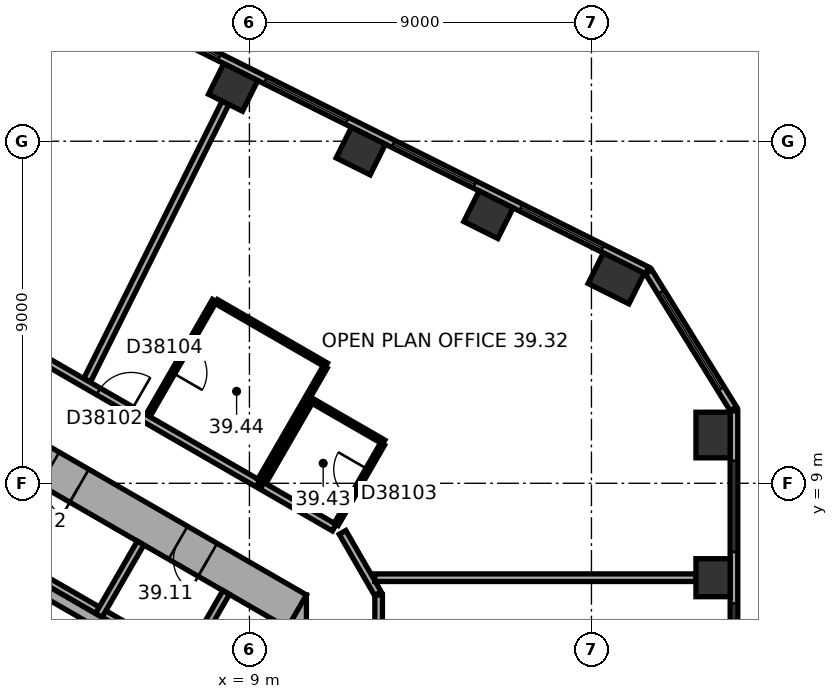
"""IFC4 building model, lengths in metres.
Left out: names, types, materials, properties, quantities, classifications, styles, units other than length and angle.
Written with IfcOpenShell. Run it as: python <this file> out.ifc"""

import sys

from ifc_helpers import new_model, si_unit, direction, frame, frame_2d, origin, origin_2d, place, context, subcontext, project, spatial, rectangle, extrude, element, fill, save


model = new_model("IFC4")
c1 = context("Model", 3, precision=1e-05, world=origin(), true_north=direction((0.0, 1.0)))
c2 = subcontext(c1, "Body", "Model", "MODEL_VIEW")
j1 = project(units=[si_unit("LENGTHUNIT", "METRE"), si_unit("PLANEANGLEUNIT", "RADIAN")], contexts=[c1])
p1 = place(None, origin())
s1 = spatial("IfcSite", under=j1, at=p1, CompositionType="ELEMENT")
p2 = place(p1, origin())
s2 = spatial("IfcBuilding", under=s1, at=p2, CompositionType="ELEMENT")
p3 = place(p2, frame((0.0, 0.0, 161.4)))
s3 = spatial("IfcBuildingStorey", under=s2, at=p3, CompositionType="ELEMENT", Elevation=161.4)
p4 = place(p3, frame((21.2, 6.515, 0.0), z_axis=(0.0, 0.0, 1.0), x_axis=(0.0, 1.0, 0.0)))
e1 = element("IfcColumn", 1, at=p4, inside=s3, PredefinedType="COLUMN", context=c2, shape_type="SweptSolid", body=[
    extrude(rectangle(XDim=1.0, YDim=0.9, at=origin_2d()), origin(), (0.0, 0.0, 1.0), 3.7),
])
for number, where, z_axis, x_axis in (
    (2, (21.2, 10.27, 0.0), (0.0, 0.0, 1.0), (0.0, 1.0, 0.0)),
    (3, (18.65, 14.39, 0.0), (0.0, 0.0, 1.0), (-0.895, 0.446, 0.0)),
):
    element("IfcColumn", number, at=place(p3, frame(where, z_axis=z_axis, x_axis=x_axis)), inside=s3, PredefinedType="COLUMN", context=c2, shape_type="SweptSolid", body=[
        extrude(rectangle(XDim=1.2, YDim=0.9, at=origin_2d()), origin(), (0.0, 0.0, 1.0), 3.7),
    ])
for number, where, z_axis, x_axis in (
    (4, (15.29, 16.065, 0.0), (0.0, 0.0, 1.0), (-0.895, 0.446, 0.0)),
    (5, (11.931, 17.74, 0.0), (0.0, 0.0, 1.0), (-0.895, 0.446, 0.0)),
    (6, (8.571, 19.416, 0.0), (0.0, 0.0, 1.0), (-0.895, 0.446, 0.0)),
):
    element("IfcColumn", number, at=place(p3, frame(where, z_axis=z_axis, x_axis=x_axis)), inside=s3, PredefinedType="COLUMN", context=c2, shape_type="SweptSolid", body=[
        extrude(rectangle(XDim=1.0, YDim=0.9, at=origin_2d()), origin(), (0.0, 0.0, 1.0), 3.7),
    ])
p5 = place(p3, frame((10.0, -6.062, 0.0), z_axis=(0.0, 0.0, 1.0), x_axis=(0.0, 1.0, 0.0)))
e7 = element("IfcWall", 7, at=p5, inside=s3, PredefinedType="SHEAR", context=c2, shape_type="SweptSolid", body=[
    extrude(rectangle(XDim=12.125, YDim=1.0, at=frame_2d((6.062, 0.0))), origin(), (0.0, 0.0, 1.0), 3.7),
])
p6 = place(p5, frame((6.262, 0.0, 0.0)))
e8 = element("IfcOpeningElement", 8, at=p6, cuts=e7, PredefinedType="OPENING", context=c2, shape_type="SweptSolid", body=[
    extrude(rectangle(XDim=1.5, YDim=2.1, at=frame_2d((0.75, 1.05))), frame((0.0, 0.51, 0.0), z_axis=(0.0, -1.0, 0.0), x_axis=(1.0, 0.0, 0.0)), (0.0, 0.0, 1.0), 1.02),
])
p7 = place(p5, frame((1.812, 0.0, 0.0)))
e9 = element("IfcOpeningElement", 9, at=p7, cuts=e7, PredefinedType="OPENING", context=c2, shape_type="SweptSolid", body=[
    extrude(rectangle(XDim=0.9, YDim=2.1, at=frame_2d((0.45, 1.05))), frame((0.0, 0.51, 0.0), z_axis=(0.0, -1.0, 0.0), x_axis=(1.0, 0.0, 0.0)), (0.0, 0.0, 1.0), 1.02),
])
p8 = place(p5, frame((4.412, 0.0, 0.0)))
e10 = element("IfcOpeningElement", 10, at=p8, cuts=e7, PredefinedType="OPENING", context=c2, shape_type="SweptSolid", body=[
    extrude(rectangle(XDim=0.9, YDim=2.1, at=frame_2d((0.45, 1.05))), frame((0.0, 0.51, 0.0), z_axis=(0.0, -1.0, 0.0), x_axis=(1.0, 0.0, 0.0)), (0.0, 0.0, 1.0), 1.02),
])
p9 = place(p3, frame((10.25, 5.629, 0.0), z_axis=(0.0, 0.0, 1.0), x_axis=(-0.866022616891, 0.50000482701, 0.0)))
e11 = element("IfcWall", 11, at=p9, inside=s3, PredefinedType="SHEAR", context=c2, shape_type="SweptSolid", body=[
    extrude(rectangle(XDim=12.125, YDim=1.0, at=frame_2d((6.062, 0.0))), origin(), (0.0, 0.0, 1.0), 3.7),
])
p10 = place(p9, frame((2.712, 0.0, 0.0)))
e12 = element("IfcOpeningElement", 12, at=p10, cuts=e11, PredefinedType="OPENING", context=c2, shape_type="SweptSolid", body=[
    extrude(rectangle(XDim=0.9, YDim=2.1, at=frame_2d((0.45, 1.05))), frame((0.0, 0.51, 0.0), z_axis=(0.0, -1.0, 0.0), x_axis=(1.0, 0.0, 0.0)), (0.0, 0.0, 1.0), 1.02),
])
p11 = place(p9, frame((6.612, 0.0, 0.0)))
e13 = element("IfcOpeningElement", 13, at=p11, cuts=e11, PredefinedType="OPENING", context=c2, shape_type="SweptSolid", body=[
    extrude(rectangle(XDim=0.9, YDim=2.1, at=frame_2d((0.45, 1.05))), frame((0.0, 0.51, 0.0), z_axis=(0.0, -1.0, 0.0), x_axis=(1.0, 0.0, 0.0)), (0.0, 0.0, 1.0), 1.02),
])
p12 = place(p3, frame((21.75, -9.138, 0.0), z_axis=(0.0, 0.0, 1.0), x_axis=(0.0, 1.0, 0.0)))
e14 = element("IfcWall", 14, at=p12, inside=s3, PredefinedType="STANDARD", context=c2, shape_type="SweptSolid", body=[
    extrude(rectangle(XDim=20.044, YDim=0.2, at=frame_2d((10.022, 0.0))), origin(), (0.0, 0.0, 1.0), 3.7),
])
p13 = place(p12, frame((1.314, 0.0, 0.9)))
e15 = element("IfcOpeningElement", 15, at=p13, cuts=e14, PredefinedType="OPENING", context=c2, shape_type="SweptSolid", body=[
    extrude(rectangle(XDim=2.4, YDim=2.0, at=frame_2d((1.2, 1.0))), frame((0.0, 0.11, 0.0), z_axis=(0.0, -1.0, 0.0), x_axis=(1.0, 0.0, 0.0)), (0.0, 0.0, 1.0), 0.22),
])
p14 = place(p12, frame((5.069, 0.0, 0.9)))
e16 = element("IfcOpeningElement", 16, at=p14, cuts=e14, PredefinedType="OPENING", context=c2, shape_type="SweptSolid", body=[
    extrude(rectangle(XDim=2.4, YDim=2.0, at=frame_2d((1.2, 1.0))), frame((0.0, 0.11, 0.0), z_axis=(0.0, -1.0, 0.0), x_axis=(1.0, 0.0, 0.0)), (0.0, 0.0, 1.0), 0.22),
])
p15 = place(p12, frame((8.823, 0.0, 0.9)))
e17 = element("IfcOpeningElement", 17, at=p15, cuts=e14, PredefinedType="OPENING", context=c2, shape_type="SweptSolid", body=[
    extrude(rectangle(XDim=2.4, YDim=2.0, at=frame_2d((1.2, 1.0))), frame((0.0, 0.11, 0.0), z_axis=(0.0, -1.0, 0.0), x_axis=(1.0, 0.0, 0.0)), (0.0, 0.0, 1.0), 0.22),
])
p16 = place(p12, frame((12.577, 0.0, 0.9)))
e18 = element("IfcOpeningElement", 18, at=p16, cuts=e14, PredefinedType="OPENING", context=c2, shape_type="SweptSolid", body=[
    extrude(rectangle(XDim=2.4, YDim=2.0, at=frame_2d((1.2, 1.0))), frame((0.0, 0.11, 0.0), z_axis=(0.0, -1.0, 0.0), x_axis=(1.0, 0.0, 0.0)), (0.0, 0.0, 1.0), 0.22),
])
p17 = place(p12, frame((16.331, 0.0, 0.9)))
e19 = element("IfcOpeningElement", 19, at=p17, cuts=e14, PredefinedType="OPENING", context=c2, shape_type="SweptSolid", body=[
    extrude(rectangle(XDim=2.4, YDim=2.0, at=frame_2d((1.2, 1.0))), frame((0.0, 0.11, 0.0), z_axis=(0.0, -1.0, 0.0), x_axis=(1.0, 0.0, 0.0)), (0.0, 0.0, 1.0), 0.22),
])
p18 = place(p3, frame((21.735, 10.958, 0.0), z_axis=(0.0, 0.0, 1.0), x_axis=(-0.526213807775, 0.850352296702, 0.0)))
e20 = element("IfcWall", 20, at=p18, inside=s3, PredefinedType="STANDARD", context=c2, shape_type="SweptSolid", body=[
    extrude(rectangle(XDim=4.238, YDim=0.2, at=frame_2d((2.119, 0.0))), origin(), (0.0, 0.0, 1.0), 3.7),
])
p19 = place(p18, frame((0.619, 0.0, 0.9)))
e21 = element("IfcOpeningElement", 21, at=p19, cuts=e20, PredefinedType="OPENING", context=c2, shape_type="SweptSolid", body=[
    extrude(rectangle(XDim=3.0, YDim=2.0, at=frame_2d((1.5, 1.0))), frame((0.0, 0.11, 0.0), z_axis=(0.0, -1.0, 0.0), x_axis=(1.0, 0.0, 0.0)), (0.0, 0.0, 1.0), 0.22),
])
p20 = place(p3, frame((19.464, 14.599, 0.0), z_axis=(0.0, 0.0, 1.0), x_axis=(-0.894935755043, 0.446195018289, 0.0)))
e22 = element("IfcWall", 22, at=p20, inside=s3, PredefinedType="STANDARD", context=c2, shape_type="SweptSolid", body=[
    extrude(rectangle(XDim=20.044, YDim=0.2, at=frame_2d((10.022, 0.0))), origin(), (0.0, 0.0, 1.0), 3.7),
])
p21 = place(p20, frame((1.313, 0.0, 0.9)))
e23 = element("IfcOpeningElement", 23, at=p21, cuts=e22, PredefinedType="OPENING", context=c2, shape_type="SweptSolid", body=[
    extrude(rectangle(XDim=2.4, YDim=2.0, at=frame_2d((1.2, 1.0))), frame((0.0, 0.11, 0.0), z_axis=(0.0, -1.0, 0.0), x_axis=(1.0, 0.0, 0.0)), (0.0, 0.0, 1.0), 0.22),
])
p22 = place(p20, frame((5.067, 0.0, 0.9)))
e24 = element("IfcOpeningElement", 24, at=p22, cuts=e22, PredefinedType="OPENING", context=c2, shape_type="SweptSolid", body=[
    extrude(rectangle(XDim=2.4, YDim=2.0, at=frame_2d((1.2, 1.0))), frame((0.0, 0.11, 0.0), z_axis=(0.0, -1.0, 0.0), x_axis=(1.0, 0.0, 0.0)), (0.0, 0.0, 1.0), 0.22),
])
p23 = place(p20, frame((8.821, 0.0, 0.9)))
e25 = element("IfcOpeningElement", 25, at=p23, cuts=e22, PredefinedType="OPENING", context=c2, shape_type="SweptSolid", body=[
    extrude(rectangle(XDim=2.4, YDim=2.0, at=frame_2d((1.2, 1.0))), frame((0.0, 0.11, 0.0), z_axis=(0.0, -1.0, 0.0), x_axis=(1.0, 0.0, 0.0)), (0.0, 0.0, 1.0), 0.22),
])
p24 = place(p20, frame((12.575, 0.0, 0.9)))
e26 = element("IfcOpeningElement", 26, at=p24, cuts=e22, PredefinedType="OPENING", context=c2, shape_type="SweptSolid", body=[
    extrude(rectangle(XDim=2.4, YDim=2.0, at=frame_2d((1.2, 1.0))), frame((0.0, 0.11, 0.0), z_axis=(0.0, -1.0, 0.0), x_axis=(1.0, 0.0, 0.0)), (0.0, 0.0, 1.0), 0.22),
])
p25 = place(p20, frame((16.329, 0.0, 0.9)))
e27 = element("IfcOpeningElement", 27, at=p25, cuts=e22, PredefinedType="OPENING", context=c2, shape_type="SweptSolid", body=[
    extrude(rectangle(XDim=2.4, YDim=2.0, at=frame_2d((1.2, 1.0))), frame((0.0, 0.11, 0.0), z_axis=(0.0, -1.0, 0.0), x_axis=(1.0, 0.0, 0.0)), (0.0, 0.0, 1.0), 0.22),
])
p26 = place(p3, frame((7.424, 4.259, 0.0), z_axis=(0.0, 0.0, 1.0), x_axis=(-0.866026010844, 0.49999894854, 0.0)))
e28 = element("IfcWall", 28, at=p26, inside=s3, PredefinedType="PARTITIONING", context=c2, shape_type="SweptSolid", body=[
    extrude(rectangle(XDim=8.0, YDim=0.2, at=frame_2d((4.0, 0.0))), origin(), (0.0, 0.0, 1.0), 3.42),
])
for number, where, z_axis, x_axis in (
    (29, (7.287, 4.222, 0.0), (0.0, 0.0, 1.0), (0.5, 0.866, 0.0)),
    (30, (5.036, 5.522, 0.0), (0.0, 0.0, 1.0), (0.5, 0.866, 0.0)),
):
    element("IfcWall", number, at=place(p3, frame(where, z_axis=z_axis, x_axis=x_axis)), inside=s3, PredefinedType="PARTITIONING", context=c2, shape_type="SweptSolid", body=[
        extrude(rectangle(XDim=2.2, YDim=0.2, at=frame_2d((1.1, 0.0))), origin(), (0.0, 0.0, 1.0), 3.42),
    ])
p27 = place(p3, frame((6.303, 4.617, 0.0), z_axis=(0.0, 0.0, 1.0), x_axis=(-0.866027801685, 0.499995846692, 0.0)))
e31 = element("IfcWall", 31, at=p27, inside=s3, PredefinedType="SHEAR", context=c2, shape_type="SweptSolid", body=[
    extrude(rectangle(XDim=7.06, YDim=0.3, at=frame_2d((3.53, 0.0))), origin(), (0.0, 0.0, 1.0), 3.42),
])
p28 = place(p3, frame((6.33, 10.779, 0.0), z_axis=(0.0, 0.0, 1.0), x_axis=(0.500010275428, 0.866019471182, 0.0)))
e32 = element("IfcWall", 32, at=p28, inside=s3, PredefinedType="PARTITIONING", context=c2, shape_type="SweptSolid", body=[
    extrude(rectangle(XDim=3.5, YDim=0.12, at=frame_2d((1.75, 0.0))), origin(), (0.0, 0.0, 1.0), 3.42),
])
p29 = place(p28, frame((1.3, 0.0, 0.0)))
e33 = element("IfcOpeningElement", 33, at=p29, cuts=e32, PredefinedType="OPENING", context=c2, shape_type="SweptSolid", body=[
    extrude(rectangle(XDim=0.9, YDim=2.1, at=frame_2d((0.45, 1.05))), frame((0.0, 0.07, 0.0), z_axis=(0.0, -1.0, 0.0), x_axis=(1.0, 0.0, 0.0)), (0.0, 0.0, 1.0), 0.14),
])
p30 = place(p3, frame((8.132, 13.78, 0.0), z_axis=(0.0, 0.0, 1.0), x_axis=(0.866039519639, -0.499975549825, 0.0)))
e34 = element("IfcWall", 34, at=p30, inside=s3, PredefinedType="PARTITIONING", context=c2, shape_type="SweptSolid", body=[
    extrude(rectangle(XDim=3.34, YDim=0.12, at=frame_2d((1.67, 0.0))), origin(), (0.0, 0.0, 1.0), 3.42),
])
p31 = place(p3, frame((8.37, 19.013, 0.0), z_axis=(0.0, 0.0, 1.0), x_axis=(-0.446183598632, -0.894941448538, 0.0)))
e35 = element("IfcWall", 35, at=p31, inside=s3, PredefinedType="PARTITIONING", context=c2, shape_type="SweptSolid", body=[
    extrude(rectangle(XDim=8.156, YDim=0.2, at=frame_2d((4.078, 0.0))), origin(), (0.0, 0.0, 1.0), 3.42),
])
p32 = place(p3, frame((9.224, 8.993, 0.0), z_axis=(0.0, 0.0, 1.0), x_axis=(-0.866031754707, 0.499988999718, 0.0)))
e36 = element("IfcWall", 36, at=p32, inside=s3, PredefinedType="PARTITIONING", context=c2, shape_type="SweptSolid", body=[
    extrude(rectangle(XDim=9.514, YDim=0.2, at=frame_2d((4.757, 0.0))), origin(), (0.0, 0.0, 1.0), 3.42),
])
p33 = place(p32, frame((3.848, 0.0, 0.0)))
e37 = element("IfcOpeningElement", 37, at=p33, cuts=e36, PredefinedType="OPENING", context=c2, shape_type="SweptSolid", body=[
    extrude(rectangle(XDim=1.0, YDim=2.1, at=frame_2d((0.5, 1.05))), frame((0.0, 0.11, 0.0), z_axis=(0.0, -1.0, 0.0), x_axis=(1.0, 0.0, 0.0)), (0.0, 0.0, 1.0), 0.22),
])
p34 = place(p3, frame((9.378, 9.019, 0.0), z_axis=(0.0, 0.0, 1.0), x_axis=(0.500004234368, 0.866022959057, 0.0)))
e38 = element("IfcWall", 38, at=p34, inside=s3, PredefinedType="PARTITIONING", context=c2, shape_type="SweptSolid", body=[
    extrude(rectangle(XDim=2.5, YDim=0.12, at=frame_2d((1.25, 0.0))), origin(), (0.0, 0.0, 1.0), 3.42),
])
p35 = place(p3, frame((10.68, 11.154, 0.0), z_axis=(0.0, 0.0, 1.0), x_axis=(0.86600889856, -0.500028586798, 0.0)))
e39 = element("IfcWall", 39, at=p35, inside=s3, PredefinedType="PARTITIONING", context=c2, shape_type="SweptSolid", body=[
    extrude(rectangle(XDim=2.14, YDim=0.12, at=frame_2d((1.07, 0.0))), origin(), (0.0, 0.0, 1.0), 3.42),
])
p36 = place(p3, frame((10.994, 12.058, 0.0), z_axis=(0.0, 0.0, 1.0), x_axis=(-0.500009156386, -0.866020117278, 0.0)))
e40 = element("IfcWall", 40, at=p36, inside=s3, PredefinedType="PARTITIONING", context=c2, shape_type="SweptSolid", body=[
    extrude(rectangle(XDim=3.44, YDim=0.12, at=frame_2d((1.72, 0.0))), origin(), (0.0, 0.0, 1.0), 3.42),
])
p37 = place(p3, frame((11.233, 7.833, 0.0), z_axis=(0.0, 0.0, 1.0), x_axis=(-0.866008176907, 0.50002983664, 0.0)))
e41 = element("IfcWall", 41, at=p37, inside=s3, PredefinedType="PARTITIONING", context=c2, shape_type="SweptSolid", body=[
    extrude(rectangle(XDim=2.2, YDim=0.2, at=frame_2d((1.1, 0.0))), origin(), (0.0, 0.0, 1.0), 3.42),
])
p38 = place(p3, frame((12.38, 6.097, 0.0), z_axis=(0.0, 0.0, 1.0), x_axis=(-0.499964847546, 0.866045698112, 0.0)))
e42 = element("IfcWall", 42, at=p38, inside=s3, PredefinedType="PARTITIONING", context=c2, shape_type="SweptSolid", body=[
    extrude(rectangle(XDim=1.86, YDim=0.2, at=frame_2d((0.93, 0.0))), origin(), (0.0, 0.0, 1.0), 3.42),
])
p39 = place(p3, frame((12.4, 2.761, 0.0), z_axis=(0.0, 0.0, 1.0), x_axis=(0.0, 1.0, 0.0)))
e43 = element("IfcWall", 43, at=p39, inside=s3, PredefinedType="PARTITIONING", context=c2, shape_type="SweptSolid", body=[
    extrude(rectangle(XDim=3.301, YDim=0.2, at=frame_2d((1.65, 0.0))), origin(), (0.0, 0.0, 1.0), 3.42),
])
p40 = place(p3, frame((12.503, 10.032, 0.0), z_axis=(0.0, 0.0, 1.0), x_axis=(-0.500002508028, -0.866023955769, 0.0)))
e44 = element("IfcWall", 44, at=p40, inside=s3, PredefinedType="PARTITIONING", context=c2, shape_type="SweptSolid", body=[
    extrude(rectangle(XDim=2.44, YDim=0.12, at=frame_2d((1.22, 0.0))), origin(), (0.0, 0.0, 1.0), 3.42),
])
p41 = place(p40, frame((0.77, 0.0, 0.0)))
e45 = element("IfcOpeningElement", 45, at=p41, cuts=e44, PredefinedType="OPENING", context=c2, shape_type="SweptSolid", body=[
    extrude(rectangle(XDim=0.9, YDim=2.1, at=frame_2d((0.45, 1.05))), frame((0.0, 0.07, 0.0), z_axis=(0.0, -1.0, 0.0), x_axis=(1.0, 0.0, 0.0)), (0.0, 0.0, 1.0), 0.14),
])
p42 = place(p3, frame((20.75, 6.515, 0.0), z_axis=(0.0, 0.0, 1.0), x_axis=(-1.0, 0.0, 0.0)))
e46 = element("IfcWall", 46, at=p42, inside=s3, PredefinedType="PARTITIONING", context=c2, shape_type="SweptSolid", body=[
    extrude(rectangle(XDim=8.452, YDim=0.2, at=frame_2d((4.226, 0.0))), origin(), (0.0, 0.0, 1.0), 3.42),
])
p43 = place(p16, origin())
e47 = element("IfcWindow", 47, at=p43, inside=s3, PartitioningType="SINGLE_PANEL", PredefinedType="WINDOW", context=c2, shape_type="SweptSolid", body=[
    extrude(rectangle(XDim=2.4, YDim=2.0, at=frame_2d((1.2, 1.0))), frame((0.0, 0.03, 0.0), z_axis=(0.0, -1.0, 0.0), x_axis=(1.0, 0.0, 0.0)), (0.0, 0.0, 1.0), 0.06),
])
fill(e18, e47)
p44 = place(p17, origin())
e48 = element("IfcWindow", 48, at=p44, inside=s3, PartitioningType="SINGLE_PANEL", PredefinedType="WINDOW", context=c2, shape_type="SweptSolid", body=[
    extrude(rectangle(XDim=2.4, YDim=2.0, at=frame_2d((1.2, 1.0))), frame((0.0, 0.03, 0.0), z_axis=(0.0, -1.0, 0.0), x_axis=(1.0, 0.0, 0.0)), (0.0, 0.0, 1.0), 0.06),
])
fill(e19, e48)
p45 = place(p19, origin())
e49 = element("IfcWindow", 49, at=p45, inside=s3, PartitioningType="SINGLE_PANEL", PredefinedType="WINDOW", context=c2, shape_type="SweptSolid", body=[
    extrude(rectangle(XDim=3.0, YDim=2.0, at=frame_2d((1.5, 1.0))), frame((0.0, 0.03, 0.0), z_axis=(0.0, -1.0, 0.0), x_axis=(1.0, 0.0, 0.0)), (0.0, 0.0, 1.0), 0.06),
])
fill(e21, e49)
p46 = place(p21, origin())
e50 = element("IfcWindow", 50, at=p46, inside=s3, PartitioningType="SINGLE_PANEL", PredefinedType="WINDOW", context=c2, shape_type="SweptSolid", body=[
    extrude(rectangle(XDim=2.4, YDim=2.0, at=frame_2d((1.2, 1.0))), frame((0.0, 0.03, 0.0), z_axis=(0.0, -1.0, 0.0), x_axis=(1.0, 0.0, 0.0)), (0.0, 0.0, 1.0), 0.06),
])
fill(e23, e50)
p47 = place(p22, origin())
e51 = element("IfcWindow", 51, at=p47, inside=s3, PartitioningType="SINGLE_PANEL", PredefinedType="WINDOW", context=c2, shape_type="SweptSolid", body=[
    extrude(rectangle(XDim=2.4, YDim=2.0, at=frame_2d((1.2, 1.0))), frame((0.0, 0.03, 0.0), z_axis=(0.0, -1.0, 0.0), x_axis=(1.0, 0.0, 0.0)), (0.0, 0.0, 1.0), 0.06),
])
fill(e24, e51)
p48 = place(p23, origin())
e52 = element("IfcWindow", 52, at=p48, inside=s3, PartitioningType="SINGLE_PANEL", PredefinedType="WINDOW", context=c2, shape_type="SweptSolid", body=[
    extrude(rectangle(XDim=2.4, YDim=2.0, at=frame_2d((1.2, 1.0))), frame((0.0, 0.03, 0.0), z_axis=(0.0, -1.0, 0.0), x_axis=(1.0, 0.0, 0.0)), (0.0, 0.0, 1.0), 0.06),
])
fill(e25, e52)
p49 = place(p24, origin())
e53 = element("IfcWindow", 53, at=p49, inside=s3, PartitioningType="SINGLE_PANEL", PredefinedType="WINDOW", context=c2, shape_type="SweptSolid", body=[
    extrude(rectangle(XDim=2.4, YDim=2.0, at=frame_2d((1.2, 1.0))), frame((0.0, 0.03, 0.0), z_axis=(0.0, -1.0, 0.0), x_axis=(1.0, 0.0, 0.0)), (0.0, 0.0, 1.0), 0.06),
])
fill(e26, e53)
p50 = place(p10, origin())
e54 = element("IfcDoor", 54, at=p50, inside=s3, OperationType="SINGLE_SWING_LEFT", PredefinedType="DOOR", context=c2, shape_type="SweptSolid", body=[
    extrude(rectangle(XDim=0.9, YDim=2.1, at=frame_2d((0.45, 1.05))), frame((0.0, 0.025, 0.0), z_axis=(0.0, -1.0, 0.0), x_axis=(1.0, 0.0, 0.0)), (0.0, 0.0, 1.0), 0.05),
])
fill(e12, e54)
p51 = place(p11, origin())
e55 = element("IfcDoor", 55, at=p51, inside=s3, OperationType="SINGLE_SWING_LEFT", PredefinedType="DOOR", context=c2, shape_type="SweptSolid", body=[
    extrude(rectangle(XDim=0.9, YDim=2.1, at=frame_2d((0.45, 1.05))), frame((0.0, 0.025, 0.0), z_axis=(0.0, -1.0, 0.0), x_axis=(1.0, 0.0, 0.0)), (0.0, 0.0, 1.0), 0.05),
])
fill(e13, e55)
p52 = place(p33, origin())
e56 = element("IfcDoor", 56, at=p52, inside=s3, OperationType="SINGLE_SWING_LEFT", PredefinedType="DOOR", context=c2, shape_type="SweptSolid", body=[
    extrude(rectangle(XDim=1.0, YDim=2.1, at=frame_2d((0.5, 1.05))), frame((0.0, 0.025, 0.0), z_axis=(0.0, -1.0, 0.0), x_axis=(1.0, 0.0, 0.0)), (0.0, 0.0, 1.0), 0.05),
])
fill(e37, e56)
p53 = place(p41, origin())
e57 = element("IfcDoor", 57, at=p53, inside=s3, OperationType="SINGLE_SWING_LEFT", PredefinedType="DOOR", context=c2, shape_type="SweptSolid", body=[
    extrude(rectangle(XDim=0.9, YDim=2.1, at=frame_2d((0.45, 1.05))), frame((0.0, 0.025, 0.0), z_axis=(0.0, -1.0, 0.0), x_axis=(1.0, 0.0, 0.0)), (0.0, 0.0, 1.0), 0.05),
])
fill(e45, e57)
p54 = place(p29, origin())
e58 = element("IfcDoor", 58, at=p54, inside=s3, OperationType="SINGLE_SWING_LEFT", PredefinedType="DOOR", context=c2, shape_type="SweptSolid", body=[
    extrude(rectangle(XDim=0.9, YDim=2.1, at=frame_2d((0.45, 1.05))), frame((0.0, 0.025, 0.0), z_axis=(0.0, -1.0, 0.0), x_axis=(1.0, 0.0, 0.0)), (0.0, 0.0, 1.0), 0.05),
])
fill(e33, e58)
save(model, sys.argv[1])
